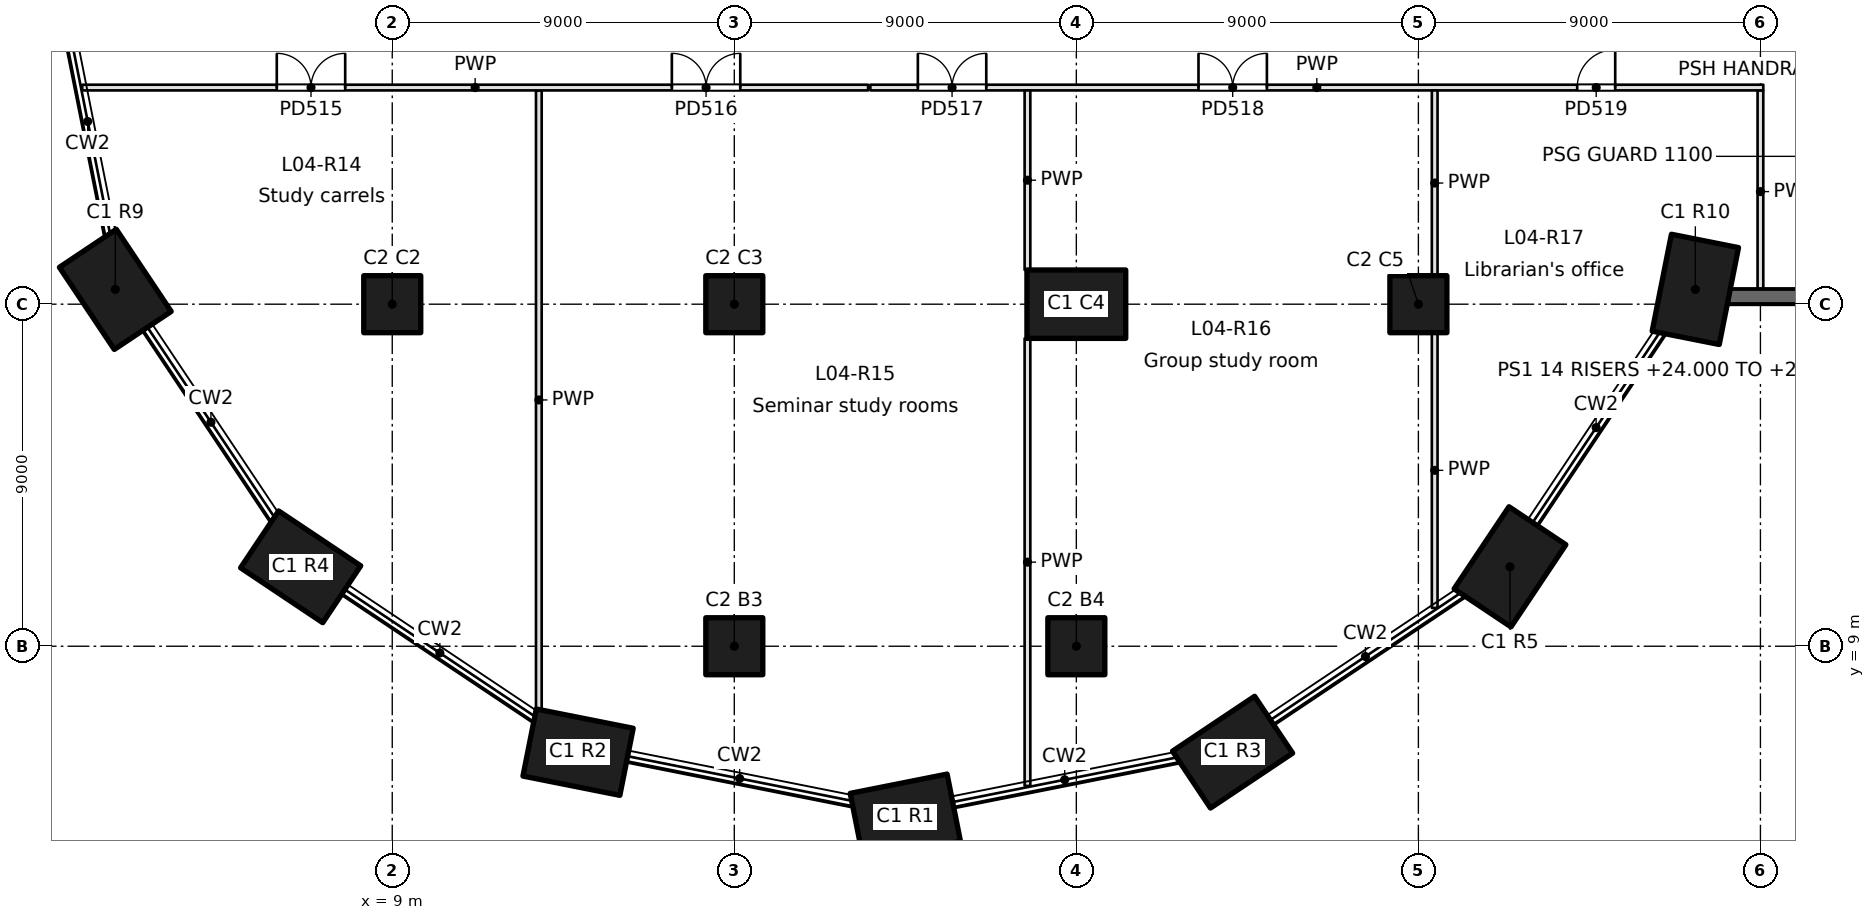
"""IFC4 building model, lengths in metres.
Left out: names, types, materials, properties, quantities, classifications, styles, units other than length and angle.
Written with IfcOpenShell. Run it as: python <this file> out.ifc"""

import sys

from ifc_helpers import new_model, si_unit, direction, frame, frame_2d, origin, origin_2d, place, context, subcontext, project, spatial, rectangle, extrude, element, fill, save


model = new_model("IFC4")
c1 = context("Model", 3, precision=1e-05, world=origin(), true_north=direction((0.0, 1.0)))
c2 = subcontext(c1, "Body", "Model", "MODEL_VIEW")
j1 = project(units=[si_unit("LENGTHUNIT", "METRE"), si_unit("PLANEANGLEUNIT", "RADIAN")], contexts=[c1])
p1 = place(None, origin())
s1 = spatial("IfcSite", under=j1, at=p1, CompositionType="ELEMENT")
p2 = place(p1, origin())
s2 = spatial("IfcBuilding", under=s1, at=p2, CompositionType="ELEMENT")
p3 = place(p2, frame((0.0, 0.0, 21.6)))
s3 = spatial("IfcBuildingStorey", under=s2, at=p3, CompositionType="ELEMENT", Elevation=21.6)
for number, where, z_axis, x_axis in (
    (1, (22.5, 4.5, 0.0), (0.0, 0.0, 1.0), (0.981, 0.195, 0.0)),
    (2, (13.89, 6.213, 0.0), (0.0, 0.0, 1.0), (-0.981, 0.195, 0.0)),
    (3, (31.11, 6.213, 0.0), (0.0, 0.0, 1.0), (0.831, 0.556, 0.0)),
    (4, (6.59, 11.09, 0.0), (0.0, 0.0, 1.0), (-0.831, 0.556, 0.0)),
    (5, (38.41, 11.09, 0.0), (0.0, 0.0, 1.0), (0.556, 0.831, 0.0)),
    (6, (1.713, 18.39, 0.0), (0.0, 0.0, 1.0), (-0.556, 0.831, 0.0)),
    (7, (43.287, 18.39, 0.0), (0.0, 0.0, 1.0), (0.195, 0.981, 0.0)),
):
    element("IfcColumn", number, at=place(p3, frame(where, z_axis=z_axis, x_axis=x_axis)), inside=s3, PredefinedType="COLUMN", context=c2, shape_type="SweptSolid", body=[
        extrude(rectangle(XDim=2.6, YDim=1.8, at=origin_2d()), origin(), (0.0, 0.0, 1.0), 4.8),
    ])
for number, where, z_axis, x_axis in (
    (8, (9.0, 18.0, 0.0), (0.0, 0.0, 1.0), (1.0, 0.0, 0.0)),
    (9, (18.0, 18.0, 0.0), (0.0, 0.0, 1.0), (1.0, 0.0, 0.0)),
):
    element("IfcColumn", number, at=place(p3, frame(where, z_axis=z_axis, x_axis=x_axis)), inside=s3, PredefinedType="COLUMN", context=c2, shape_type="SweptSolid", body=[
        extrude(rectangle(XDim=1.5, YDim=1.5, at=origin_2d()), origin(), (0.0, 0.0, 1.0), 4.8),
    ])
p4 = place(p3, frame((27.0, 18.0, 0.0), z_axis=(0.0, 0.0, 1.0), x_axis=(1.0, 0.0, 0.0)))
e10 = element("IfcColumn", 10, at=p4, inside=s3, PredefinedType="COLUMN", context=c2, shape_type="SweptSolid", body=[
    extrude(rectangle(XDim=2.6, YDim=1.8, at=origin_2d()), origin(), (0.0, 0.0, 1.0), 4.8),
])
for number, where, z_axis, x_axis in (
    (11, (36.0, 18.0, 0.0), (0.0, 0.0, 1.0), (1.0, 0.0, 0.0)),
    (12, (18.0, 9.0, 0.0), (0.0, 0.0, 1.0), (1.0, 0.0, 0.0)),
    (13, (27.0, 9.0, 0.0), (0.0, 0.0, 1.0), (1.0, 0.0, 0.0)),
):
    element("IfcColumn", number, at=place(p3, frame(where, z_axis=z_axis, x_axis=x_axis)), inside=s3, PredefinedType="COLUMN", context=c2, shape_type="SweptSolid", body=[
        extrude(rectangle(XDim=1.5, YDim=1.5, at=origin_2d()), origin(), (0.0, 0.0, 1.0), 4.8),
    ])
p5 = place(p3, frame((53.25, 18.2, 0.0), z_axis=(0.0, 0.0, 1.0), x_axis=(-1.0, 0.0, 0.0)))
e14 = element("IfcWall", 14, at=p5, inside=s3, PredefinedType="SOLIDWALL", context=c2, shape_type="SweptSolid", body=[
    extrude(rectangle(XDim=9.093, YDim=0.4, at=frame_2d((4.546, 0.0))), origin(), (0.0, 0.0, 1.0), 4.45),
])
p6 = place(p3, frame((45.0, 23.625, 0.0), z_axis=(0.0, 0.0, 1.0), x_axis=(0.0, -1.0, 0.0)))
e15 = element("IfcWall", 15, at=p6, inside=s3, PredefinedType="PARTITIONING", context=c2, shape_type="SweptSolid", body=[
    extrude(rectangle(XDim=5.325, YDim=0.15, at=frame_2d((2.663, 0.0))), origin(), (0.0, 0.0, 1.0), 4.45),
])
p7 = place(p3, frame((12.857, 7.336, 0.0), z_axis=(0.0, 0.0, 1.0), x_axis=(0.0, 1.0, 0.0)))
e16 = element("IfcWall", 16, at=p7, inside=s3, PredefinedType="PARTITIONING", context=c2, shape_type="SweptSolid", body=[
    extrude(rectangle(XDim=16.289, YDim=0.15, at=frame_2d((8.145, 0.0))), origin(), (0.0, 0.0, 1.0), 4.45),
])
p8 = place(p3, frame((0.842, 23.7, 0.0), z_axis=(0.0, 0.0, 1.0), x_axis=(1.0, 0.0, 0.0)))
e17 = element("IfcWall", 17, at=p8, inside=s3, PredefinedType="PARTITIONING", context=c2, shape_type="SweptSolid", body=[
    extrude(rectangle(XDim=20.678, YDim=0.15, at=frame_2d((10.339, 0.0))), origin(), (0.0, 0.0, 1.0), 4.45),
])
p9 = place(p8, frame((5.12, 0.0, 0.0)))
e18 = element("IfcOpeningElement", 18, at=p9, cuts=e17, PredefinedType="OPENING", context=c2, shape_type="SweptSolid", body=[
    extrude(rectangle(XDim=1.8, YDim=2.1, at=frame_2d((0.9, 1.05))), frame((0.0, 0.075, 0.0), z_axis=(0.0, -1.0, 0.0), x_axis=(1.0, 0.0, 0.0)), (0.0, 0.0, 1.0), 0.15),
])
p10 = place(p8, frame((15.515, 0.0, 0.0)))
e19 = element("IfcOpeningElement", 19, at=p10, cuts=e17, PredefinedType="OPENING", context=c2, shape_type="SweptSolid", body=[
    extrude(rectangle(XDim=1.8, YDim=2.1, at=frame_2d((0.9, 1.05))), frame((0.0, 0.075, 0.0), z_axis=(0.0, -1.0, 0.0), x_axis=(1.0, 0.0, 0.0)), (0.0, 0.0, 1.0), 0.15),
])
p11 = place(p3, frame((21.58, 23.7, 0.0), z_axis=(0.0, 0.0, 1.0), x_axis=(1.0, 0.0, 0.0)))
e20 = element("IfcWall", 20, at=p11, inside=s3, PredefinedType="PARTITIONING", context=c2, shape_type="SweptSolid", body=[
    extrude(rectangle(XDim=23.495, YDim=0.15, at=frame_2d((11.748, 0.0))), origin(), (0.0, 0.0, 1.0), 4.45),
])
p12 = place(p11, frame((1.25, 0.0, 0.0)))
e21 = element("IfcOpeningElement", 21, at=p12, cuts=e20, PredefinedType="OPENING", context=c2, shape_type="SweptSolid", body=[
    extrude(rectangle(XDim=1.8, YDim=2.1, at=frame_2d((0.9, 1.05))), frame((0.0, 0.075, 0.0), z_axis=(0.0, -1.0, 0.0), x_axis=(1.0, 0.0, 0.0)), (0.0, 0.0, 1.0), 0.15),
])
p13 = place(p11, frame((8.634, 0.0, 0.0)))
e22 = element("IfcOpeningElement", 22, at=p13, cuts=e20, PredefinedType="OPENING", context=c2, shape_type="SweptSolid", body=[
    extrude(rectangle(XDim=1.8, YDim=2.1, at=frame_2d((0.9, 1.05))), frame((0.0, 0.075, 0.0), z_axis=(0.0, -1.0, 0.0), x_axis=(1.0, 0.0, 0.0)), (0.0, 0.0, 1.0), 0.15),
])
p14 = place(p11, frame((18.599, 0.0, 0.0)))
e23 = element("IfcOpeningElement", 23, at=p14, cuts=e20, PredefinedType="OPENING", context=c2, shape_type="SweptSolid", body=[
    extrude(rectangle(XDim=1.0, YDim=2.1, at=frame_2d((0.5, 1.05))), frame((0.0, 0.075, 0.0), z_axis=(0.0, -1.0, 0.0), x_axis=(1.0, 0.0, 0.0)), (0.0, 0.0, 1.0), 0.15),
])
p15 = place(p3, frame((25.714, 5.325, 0.0), z_axis=(0.0, 0.0, 1.0), x_axis=(0.0, 1.0, 0.0)))
e24 = element("IfcWall", 24, at=p15, inside=s3, PredefinedType="PARTITIONING", context=c2, shape_type="SweptSolid", body=[
    extrude(rectangle(XDim=11.775, YDim=0.15, at=frame_2d((5.888, 0.0))), origin(), (0.0, 0.0, 1.0), 4.45),
])
p16 = place(p3, frame((25.714, 18.9, 0.0), z_axis=(0.0, 0.0, 1.0), x_axis=(0.0, 1.0, 0.0)))
e25 = element("IfcWall", 25, at=p16, inside=s3, PredefinedType="PARTITIONING", context=c2, shape_type="SweptSolid", body=[
    extrude(rectangle(XDim=4.725, YDim=0.15, at=frame_2d((2.363, 0.0))), origin(), (0.0, 0.0, 1.0), 4.45),
])
p17 = place(p3, frame((36.429, 10.007, 0.0), z_axis=(0.0, 0.0, 1.0), x_axis=(0.0, 1.0, 0.0)))
e26 = element("IfcWall", 26, at=p17, inside=s3, PredefinedType="PARTITIONING", context=c2, shape_type="SweptSolid", body=[
    extrude(rectangle(XDim=7.243, YDim=0.15, at=frame_2d((3.622, 0.0))), origin(), (0.0, 0.0, 1.0), 4.45),
])
p18 = place(p3, frame((36.429, 18.75, 0.0), z_axis=(0.0, 0.0, 1.0), x_axis=(0.0, 1.0, 0.0)))
e27 = element("IfcWall", 27, at=p18, inside=s3, PredefinedType="PARTITIONING", context=c2, shape_type="SweptSolid", body=[
    extrude(rectangle(XDim=4.875, YDim=0.15, at=frame_2d((2.438, 0.0))), origin(), (0.0, 0.0, 1.0), 4.45),
])
p19 = place(p9, origin())
e28 = element("IfcDoor", 28, at=p19, inside=s3, OperationType="DOUBLE_DOOR_SINGLE_SWING", PredefinedType="DOOR", context=c2, shape_type="SweptSolid", body=[
    extrude(rectangle(XDim=1.8, YDim=2.1, at=frame_2d((0.9, 1.05))), frame((0.0, 0.025, 0.0), z_axis=(0.0, -1.0, 0.0), x_axis=(1.0, 0.0, 0.0)), (0.0, 0.0, 1.0), 0.05),
])
fill(e18, e28)
p20 = place(p10, origin())
e29 = element("IfcDoor", 29, at=p20, inside=s3, OperationType="DOUBLE_DOOR_SINGLE_SWING", PredefinedType="DOOR", context=c2, shape_type="SweptSolid", body=[
    extrude(rectangle(XDim=1.8, YDim=2.1, at=frame_2d((0.9, 1.05))), frame((0.0, 0.025, 0.0), z_axis=(0.0, -1.0, 0.0), x_axis=(1.0, 0.0, 0.0)), (0.0, 0.0, 1.0), 0.05),
])
fill(e19, e29)
p21 = place(p12, origin())
e30 = element("IfcDoor", 30, at=p21, inside=s3, OperationType="DOUBLE_DOOR_SINGLE_SWING", PredefinedType="DOOR", context=c2, shape_type="SweptSolid", body=[
    extrude(rectangle(XDim=1.8, YDim=2.1, at=frame_2d((0.9, 1.05))), frame((0.0, 0.025, 0.0), z_axis=(0.0, -1.0, 0.0), x_axis=(1.0, 0.0, 0.0)), (0.0, 0.0, 1.0), 0.05),
])
fill(e21, e30)
p22 = place(p13, origin())
e31 = element("IfcDoor", 31, at=p22, inside=s3, OperationType="DOUBLE_DOOR_SINGLE_SWING", PredefinedType="DOOR", context=c2, shape_type="SweptSolid", body=[
    extrude(rectangle(XDim=1.8, YDim=2.1, at=frame_2d((0.9, 1.05))), frame((0.0, 0.025, 0.0), z_axis=(0.0, -1.0, 0.0), x_axis=(1.0, 0.0, 0.0)), (0.0, 0.0, 1.0), 0.05),
])
fill(e22, e31)
p23 = place(p14, origin())
e32 = element("IfcDoor", 32, at=p23, inside=s3, OperationType="SINGLE_SWING_RIGHT", PredefinedType="DOOR", context=c2, shape_type="SweptSolid", body=[
    extrude(rectangle(XDim=1.0, YDim=2.1, at=frame_2d((0.5, 1.05))), frame((0.0, 0.025, 0.0), z_axis=(0.0, -1.0, 0.0), x_axis=(1.0, 0.0, 0.0)), (0.0, 0.0, 1.0), 0.05),
])
fill(e23, e32)
save(model, sys.argv[1])
